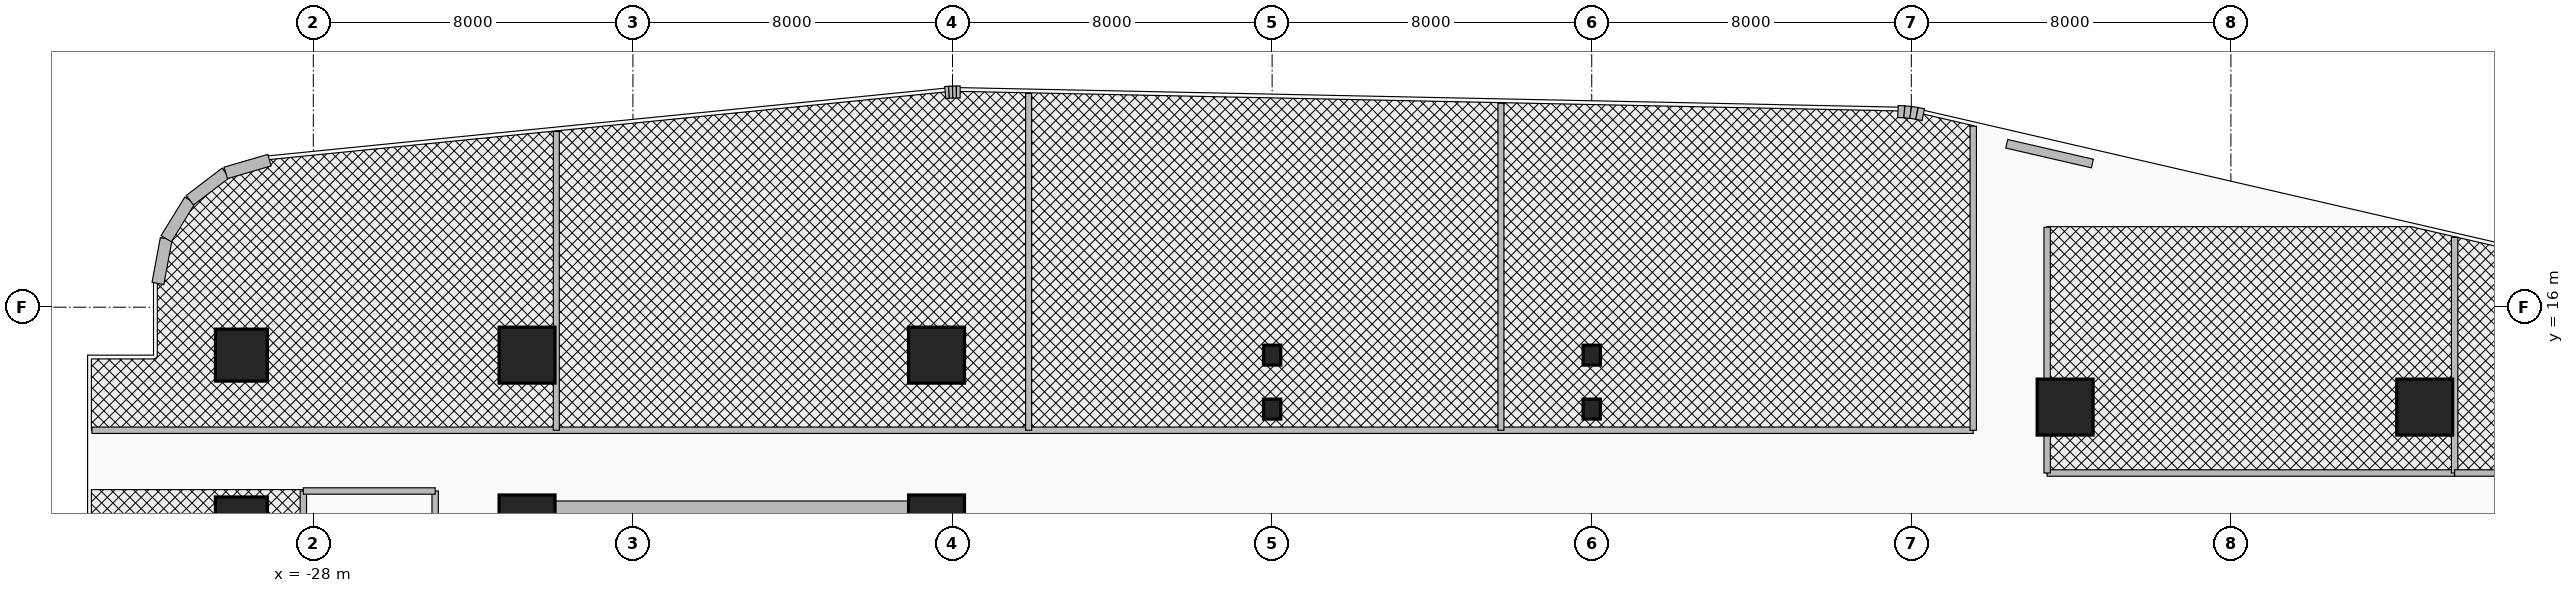
"""IFC4 building model, lengths in metres.
Left out: names, types, materials, properties, quantities, classifications, styles, units other than length and angle.
Written with IfcOpenShell. Run it as: python <this file> out.ifc"""

import sys

from ifc_helpers import new_model, si_unit, direction, frame, frame_2d, origin, origin_2d, place, context, subcontext, project, spatial, rectangle, circle, i_section, extrude, source, transform, mapped, element, fill, save


model = new_model("IFC4")
c1 = context("Model", 3, precision=1e-05, world=origin(), true_north=direction((0.0, 1.0)))
c2 = subcontext(c1, "Body", "Model", "MODEL_VIEW")
j1 = project(units=[si_unit("LENGTHUNIT", "METRE"), si_unit("PLANEANGLEUNIT", "RADIAN")], contexts=[c1])
p1 = place(None, origin())
s1 = spatial("IfcSite", under=j1, at=p1, CompositionType="ELEMENT")
p2 = place(p1, origin())
s2 = spatial("IfcBuilding", under=s1, at=p2, CompositionType="ELEMENT")
p3 = place(p2, frame((0.0, 0.0, 48.2)))
s3 = spatial("IfcBuildingStorey", under=s2, at=p3, CompositionType="ELEMENT", Elevation=48.2)
p4 = place(p3, frame((-22.65, -11.15, 0.0), z_axis=(0.0, 0.0, 1.0), x_axis=(0.0, 1.0, 0.0)))
e1 = element("IfcWall", 1, at=p4, inside=s3, PredefinedType="SHEAR", context=c2, shape_type="SweptSolid", body=[
    extrude(rectangle(XDim=22.3, YDim=0.7, at=frame_2d((11.15, 0.0))), origin(), (0.0, 0.0, 1.0), 3.46),
])
p5 = place(p3, frame((-22.65, 10.8, 0.0), z_axis=(0.0, 0.0, 1.0), x_axis=(1.0, 0.0, 0.0)))
e2 = element("IfcWall", 2, at=p5, inside=s3, PredefinedType="SHEAR", context=c2, shape_type="SweptSolid", body=[
    extrude(rectangle(XDim=10.25, YDim=0.7, at=frame_2d((5.125, 0.0))), origin(), (0.0, 0.0, 1.0), 3.46),
])
m1 = source(origin(), c2, "Body", "SweptSolid", [
    extrude(circle(Radius=0.65, at=origin_2d()), origin(), (0.0, 0.0, 1.0), 3.7),
])
p6 = place(p3, frame((-29.8, 10.6, 0.0), z_axis=(0.0, 0.0, 1.0), x_axis=(1.0, 0.0, 0.0)))
e3 = element("IfcColumn", 3, at=p6, inside=s3, PredefinedType="COLUMN", context=c2, shape_type="MappedRepresentation", body=[
    mapped(m1, transform((0.0, 0.0, 0.0), x_axis=(1.0, 0.0, 0.0), y_axis=(0.0, 1.0, 0.0), z_axis=(0.0, 0.0, 1.0), scale=1.0)),
])
m2 = source(origin(), c2, "Body", "SweptSolid", [
    extrude(rectangle(XDim=1.4, YDim=1.4, at=origin_2d()), origin(), (0.0, 0.0, 1.0), 3.7),
])
for number, where, z_axis, x_axis in (
    (4, (-22.65, 10.6, 0.0), (0.0, 0.0, 1.0), (1.0, 0.0, 0.0)),
    (5, (-12.4, 10.6, 0.0), (0.0, 0.0, 1.0), (1.0, 0.0, 0.0)),
):
    element("IfcColumn", number, at=place(p3, frame(where, z_axis=z_axis, x_axis=x_axis)), inside=s3, PredefinedType="COLUMN", context=c2, shape_type="MappedRepresentation", body=[
        mapped(m2, transform((0.0, 0.0, 0.0), x_axis=(1.0, 0.0, 0.0), y_axis=(0.0, 1.0, 0.0), z_axis=(0.0, 0.0, 1.0), scale=1.0)),
    ])
p7 = place(p3, frame((-29.8, 14.8, 0.0), z_axis=(0.0, 0.0, 1.0), x_axis=(1.0, 0.0, 0.0)))
e6 = element("IfcColumn", 6, at=p7, inside=s3, PredefinedType="COLUMN", context=c2, shape_type="MappedRepresentation", body=[
    mapped(m1, transform((0.0, 0.0, 0.0), x_axis=(1.0, 0.0, 0.0), y_axis=(0.0, 1.0, 0.0), z_axis=(0.0, 0.0, 1.0), scale=1.0)),
])
for number, where, z_axis, x_axis in (
    (7, (-22.65, 14.8, 0.0), (0.0, 0.0, 1.0), (1.0, 0.0, 0.0)),
    (8, (-12.4, 14.8, 0.0), (0.0, 0.0, 1.0), (1.0, 0.0, 0.0)),
    (9, (15.85, 13.5, 0.0), (0.0, 0.0, 1.0), (1.0, 0.0, 0.0)),
    (10, (24.85, 13.5, 0.0), (0.0, 0.0, 1.0), (1.0, 0.0, 0.0)),
):
    element("IfcColumn", number, at=place(p3, frame(where, z_axis=z_axis, x_axis=x_axis)), inside=s3, PredefinedType="COLUMN", context=c2, shape_type="MappedRepresentation", body=[
        mapped(m2, transform((0.0, 0.0, 0.0), x_axis=(1.0, 0.0, 0.0), y_axis=(0.0, 1.0, 0.0), z_axis=(0.0, 0.0, 1.0), scale=1.0)),
    ])
m3 = source(origin(), c2, "Body", "SweptSolid", [
    extrude(i_section(OverallWidth=0.432, OverallDepth=0.498, WebThickness=0.056, FlangeThickness=0.089, at=origin_2d()), origin(), (0.0, 0.0, 1.0), 3.7),
])
for number, where, z_axis, x_axis in (
    (11, (-4.0, 13.45, 0.0), (0.0, 0.0, 1.0), (1.0, 0.0, 0.0)),
    (12, (-4.0, 14.8, 0.0), (0.0, 0.0, 1.0), (1.0, 0.0, 0.0)),
    (13, (4.0, 13.45, 0.0), (0.0, 0.0, 1.0), (1.0, 0.0, 0.0)),
    (14, (4.0, 14.8, 0.0), (0.0, 0.0, 1.0), (1.0, 0.0, 0.0)),
):
    element("IfcColumn", number, at=place(p3, frame(where, z_axis=z_axis, x_axis=x_axis)), inside=s3, PredefinedType="COLUMN", context=c2, shape_type="MappedRepresentation", body=[
        mapped(m3, transform((0.0, 0.0, 0.0), x_axis=(1.0, 0.0, 0.0), y_axis=(0.0, 1.0, 0.0), z_axis=(0.0, 0.0, 1.0), scale=1.0)),
    ])
p8 = place(p3, frame((-31.89, 16.594, 0.0), z_axis=(0.0, 0.0, 1.0), x_axis=(0.182748995683, 0.9831596028, 0.0)))
e15 = element("IfcWall", 15, at=p8, inside=s3, PredefinedType="SOLIDWALL", context=c2, shape_type="SweptSolid", body=[
    extrude(rectangle(XDim=1.14, YDim=0.3, at=frame_2d((0.57, 0.0))), origin(), (0.0, 0.0, 1.0), 3.46),
])
p9 = place(p3, frame((-31.682, 17.714, 0.0), z_axis=(0.0, 0.0, 1.0), x_axis=(0.524157723014, 0.8516212077, 0.0)))
e16 = element("IfcWall", 16, at=p9, inside=s3, PredefinedType="SOLIDWALL", context=c2, shape_type="SweptSolid", body=[
    extrude(rectangle(XDim=1.129, YDim=0.3, at=frame_2d((0.565, 0.0))), origin(), (0.0, 0.0, 1.0), 3.46),
])
p10 = place(p3, frame((-31.09, 18.676, 0.0), z_axis=(0.0, 0.0, 1.0), x_axis=(0.795253002434, 0.606277710393, 0.0)))
e17 = element("IfcWall", 17, at=p10, inside=s3, PredefinedType="SOLIDWALL", context=c2, shape_type="SweptSolid", body=[
    extrude(rectangle(XDim=1.129, YDim=0.3, at=frame_2d((0.564, 0.0))), origin(), (0.0, 0.0, 1.0), 3.46),
])
p11 = place(p3, frame((-30.192, 19.361, 0.0), z_axis=(0.0, 0.0, 1.0), x_axis=(0.960071941549, 0.279753225271, 0.0)))
e18 = element("IfcWall", 18, at=p11, inside=s3, PredefinedType="SOLIDWALL", context=c2, shape_type="SweptSolid", body=[
    extrude(rectangle(XDim=1.14, YDim=0.3, at=frame_2d((0.57, 0.0))), origin(), (0.0, 0.0, 1.0), 3.46),
])
p12 = place(p3, frame((-12.182, 21.371, 0.0), z_axis=(0.0, 0.0, 1.0), x_axis=(0.996527790842, 0.08326080759, 0.0)))
e19 = element("IfcWall", 19, at=p12, inside=s3, PredefinedType="SOLIDWALL", context=c2, shape_type="SweptSolid", body=[
    extrude(rectangle(XDim=0.094, YDim=0.3, at=frame_2d((0.047, 0.0))), origin(), (0.0, 0.0, 1.0), 3.46),
])
p13 = place(p3, frame((-12.088, 21.379, 0.0), z_axis=(0.0, 0.0, 1.0), x_axis=(0.998476480444, 0.055178963393, 0.0)))
e20 = element("IfcWall", 20, at=p13, inside=s3, PredefinedType="SOLIDWALL", context=c2, shape_type="SweptSolid", body=[
    extrude(rectangle(XDim=0.093, YDim=0.3, at=frame_2d((0.046, 0.0))), origin(), (0.0, 0.0, 1.0), 3.46),
])
p14 = place(p3, frame((-11.996, 21.384, 0.0), z_axis=(0.0, 0.0, 1.0), x_axis=(0.999722573757, 0.023553673204, 0.0)))
e21 = element("IfcWall", 21, at=p14, inside=s3, PredefinedType="SOLIDWALL", context=c2, shape_type="SweptSolid", body=[
    extrude(rectangle(XDim=0.093, YDim=0.3, at=frame_2d((0.047, 0.0))), origin(), (0.0, 0.0, 1.0), 3.46),
])
p15 = place(p3, frame((-11.902, 21.386, 0.0), z_axis=(0.0, 0.0, 1.0), x_axis=(0.999986507273, -0.005194735103, 0.0)))
e22 = element("IfcWall", 22, at=p15, inside=s3, PredefinedType="SOLIDWALL", context=c2, shape_type="SweptSolid", body=[
    extrude(rectangle(XDim=0.094, YDim=0.3, at=frame_2d((0.047, 0.0))), origin(), (0.0, 0.0, 1.0), 3.46),
])
p16 = place(p3, frame((11.666, 20.897, 0.0), z_axis=(0.0, 0.0, 1.0), x_axis=(0.998885297239, -0.047203421059, 0.0)))
e23 = element("IfcWall", 23, at=p16, inside=s3, PredefinedType="SOLIDWALL", context=c2, shape_type="SweptSolid", body=[
    extrude(rectangle(XDim=0.16, YDim=0.3, at=frame_2d((0.08, 0.0))), origin(), (0.0, 0.0, 1.0), 3.46),
])
p17 = place(p3, frame((11.826, 20.889, 0.0), z_axis=(0.0, 0.0, 1.0), x_axis=(0.995172891136, -0.098137234257, 0.0)))
e24 = element("IfcWall", 24, at=p17, inside=s3, PredefinedType="SOLIDWALL", context=c2, shape_type="SweptSolid", body=[
    extrude(rectangle(XDim=0.159, YDim=0.3, at=frame_2d((0.08, 0.0))), origin(), (0.0, 0.0, 1.0), 3.46),
])
p18 = place(p3, frame((11.984, 20.874, 0.0), z_axis=(0.0, 0.0, 1.0), x_axis=(0.988846069207, -0.148941100486, 0.0)))
e25 = element("IfcWall", 25, at=p18, inside=s3, PredefinedType="SOLIDWALL", context=c2, shape_type="SweptSolid", body=[
    extrude(rectangle(XDim=0.159, YDim=0.3, at=frame_2d((0.08, 0.0))), origin(), (0.0, 0.0, 1.0), 3.46),
])
p19 = place(p3, frame((12.142, 20.85, 0.0), z_axis=(0.0, 0.0, 1.0), x_axis=(0.979991950448, -0.19903712482, 0.0)))
e26 = element("IfcWall", 26, at=p19, inside=s3, PredefinedType="SOLIDWALL", context=c2, shape_type="SweptSolid", body=[
    extrude(rectangle(XDim=0.161, YDim=0.3, at=frame_2d((0.08, 0.0))), origin(), (0.0, 0.0, 1.0), 3.46),
])
p20 = place(p3, frame((14.389, 20.09, 0.0), z_axis=(0.0, 0.0, 1.0), x_axis=(0.974400545997, -0.224818984875, 0.0)))
e27 = element("IfcWall", 27, at=p20, inside=s3, PredefinedType="SOLIDWALL", context=c2, shape_type="SweptSolid", body=[
    extrude(rectangle(XDim=2.2, YDim=0.22, at=frame_2d((1.1, 0.0))), origin(), (0.0, 0.0, 1.0), 3.46),
])
p21 = place(p20, frame((0.65, 0.0, 0.95)))
e28 = element("IfcOpeningElement", 28, at=p21, cuts=e27, PredefinedType="OPENING", context=c2, shape_type="SweptSolid", body=[
    extrude(rectangle(XDim=0.9, YDim=1.3, at=frame_2d((0.45, 0.65))), frame((0.0, 0.125, 0.0), z_axis=(0.0, -1.0, 0.0), x_axis=(1.0, 0.0, 0.0)), (0.0, 0.0, 1.0), 0.25),
])
p22 = place(p3, frame((-28.25, 8.8, 0.0), z_axis=(0.0, 0.0, 1.0), x_axis=(0.0, 1.0, 0.0)))
e29 = element("IfcWall", 29, at=p22, inside=s3, PredefinedType="PARTITIONING", context=c2, shape_type="SweptSolid", body=[
    extrude(rectangle(XDim=2.6, YDim=0.16, at=frame_2d((1.3, 0.0))), origin(), (0.0, 0.0, 1.0), 2.583),
])
p23 = place(p3, frame((-24.95, 8.8, 0.0), z_axis=(0.0, 0.0, 1.0), x_axis=(0.0, 1.0, 0.0)))
e30 = element("IfcWall", 30, at=p23, inside=s3, PredefinedType="PARTITIONING", context=c2, shape_type="SweptSolid", body=[
    extrude(rectangle(XDim=2.6, YDim=0.16, at=frame_2d((1.3, 0.0))), origin(), (0.0, 0.0, 1.0), 2.583),
])
p24 = place(p23, frame((0.3, 0.0, 0.0)))
e31 = element("IfcOpeningElement", 31, at=p24, cuts=e30, PredefinedType="OPENING", context=c2, shape_type="SweptSolid", body=[
    extrude(rectangle(XDim=0.85, YDim=2.1, at=frame_2d((0.425, 1.05))), frame((0.0, 0.095, 0.0), z_axis=(0.0, -1.0, 0.0), x_axis=(1.0, 0.0, 0.0)), (0.0, 0.0, 1.0), 0.19),
])
p25 = place(p23, frame((1.45, 0.0, 0.0)))
e32 = element("IfcOpeningElement", 32, at=p25, cuts=e30, PredefinedType="OPENING", context=c2, shape_type="SweptSolid", body=[
    extrude(rectangle(XDim=0.85, YDim=2.1, at=frame_2d((0.425, 1.05))), frame((0.0, 0.095, 0.0), z_axis=(0.0, -1.0, 0.0), x_axis=(1.0, 0.0, 0.0)), (0.0, 0.0, 1.0), 0.19),
])
p26 = place(p3, frame((-28.25, 11.4, 0.0), z_axis=(0.0, 0.0, 1.0), x_axis=(1.0, 0.0, 0.0)))
e33 = element("IfcWall", 33, at=p26, inside=s3, PredefinedType="PARTITIONING", context=c2, shape_type="SweptSolid", body=[
    extrude(rectangle(XDim=3.3, YDim=0.16, at=frame_2d((1.65, 0.0))), origin(), (0.0, 0.0, 1.0), 3.46),
])
p27 = place(p3, frame((-33.54, 12.92, 0.0), z_axis=(0.0, 0.0, 1.0), x_axis=(1.0, 0.0, 0.0)))
e34 = element("IfcWall", 34, at=p27, inside=s3, PredefinedType="PARTITIONING", context=c2, shape_type="SweptSolid", body=[
    extrude(rectangle(XDim=47.09, YDim=0.16, at=frame_2d((23.545, 0.0))), origin(), (0.0, 0.0, 1.0), 2.583),
])
p28 = place(p27, frame((4.911, 0.0, 0.0)))
e35 = element("IfcOpeningElement", 35, at=p28, cuts=e34, PredefinedType="OPENING", context=c2, shape_type="SweptSolid", body=[
    extrude(rectangle(XDim=1.8, YDim=2.15, at=frame_2d((0.9, 1.075))), frame((0.0, 0.095, 0.0), z_axis=(0.0, -1.0, 0.0), x_axis=(1.0, 0.0, 0.0)), (0.0, 0.0, 1.0), 0.19),
])
p29 = place(p27, frame((16.634, 0.0, 0.0)))
e36 = element("IfcOpeningElement", 36, at=p29, cuts=e34, PredefinedType="OPENING", context=c2, shape_type="SweptSolid", body=[
    extrude(rectangle(XDim=1.8, YDim=2.15, at=frame_2d((0.9, 1.075))), frame((0.0, 0.095, 0.0), z_axis=(0.0, -1.0, 0.0), x_axis=(1.0, 0.0, 0.0)), (0.0, 0.0, 1.0), 0.19),
])
p30 = place(p27, frame((27.285, 0.0, 0.0)))
e37 = element("IfcOpeningElement", 37, at=p30, cuts=e34, PredefinedType="OPENING", context=c2, shape_type="SweptSolid", body=[
    extrude(rectangle(XDim=1.8, YDim=2.15, at=frame_2d((0.9, 1.075))), frame((0.0, 0.095, 0.0), z_axis=(0.0, -1.0, 0.0), x_axis=(1.0, 0.0, 0.0)), (0.0, 0.0, 1.0), 0.19),
])
p31 = place(p27, frame((40.279, 0.0, 0.0)))
e38 = element("IfcOpeningElement", 38, at=p31, cuts=e34, PredefinedType="OPENING", context=c2, shape_type="SweptSolid", body=[
    extrude(rectangle(XDim=1.8, YDim=2.15, at=frame_2d((0.9, 1.075))), frame((0.0, 0.095, 0.0), z_axis=(0.0, -1.0, 0.0), x_axis=(1.0, 0.0, 0.0)), (0.0, 0.0, 1.0), 0.19),
])
p32 = place(p3, frame((13.55, 12.92, 0.0), z_axis=(0.0, 0.0, 1.0), x_axis=(0.0, 1.0, 0.0)))
e39 = element("IfcWall", 39, at=p32, inside=s3, PredefinedType="PARTITIONING", context=c2, shape_type="SweptSolid", body=[
    extrude(rectangle(XDim=7.609, YDim=0.16, at=frame_2d((3.805, 0.0))), origin(), (0.0, 0.0, 1.0), 2.583),
])
p33 = place(p3, frame((-21.917, 12.92, 0.0), z_axis=(0.0, 0.0, 1.0), x_axis=(0.0, 1.0, 0.0)))
e40 = element("IfcWall", 40, at=p33, inside=s3, PredefinedType="PARTITIONING", context=c2, shape_type="SweptSolid", body=[
    extrude(rectangle(XDim=7.478, YDim=0.15, at=frame_2d((3.739, 0.0))), origin(), (0.0, 0.0, 1.0), 2.583),
])
p34 = place(p3, frame((-10.095, 12.92, 0.0), z_axis=(0.0, 0.0, 1.0), x_axis=(0.0, 1.0, 0.0)))
e41 = element("IfcWall", 41, at=p34, inside=s3, PredefinedType="PARTITIONING", context=c2, shape_type="SweptSolid", body=[
    extrude(rectangle(XDim=8.43, YDim=0.15, at=frame_2d((4.215, 0.0))), origin(), (0.0, 0.0, 1.0), 2.583),
])
p35 = place(p3, frame((1.728, 12.92, 0.0), z_axis=(0.0, 0.0, 1.0), x_axis=(0.0, 1.0, 0.0)))
e42 = element("IfcWall", 42, at=p35, inside=s3, PredefinedType="PARTITIONING", context=c2, shape_type="SweptSolid", body=[
    extrude(rectangle(XDim=8.184, YDim=0.15, at=frame_2d((4.092, 0.0))), origin(), (0.0, 0.0, 1.0), 2.583),
])
p36 = place(p3, frame((15.4, 11.85, 0.0), z_axis=(0.0, 0.0, 1.0), x_axis=(1.0, 0.0, 0.0)))
e43 = element("IfcWall", 43, at=p36, inside=s3, PredefinedType="PARTITIONING", context=c2, shape_type="SweptSolid", body=[
    extrude(rectangle(XDim=10.2, YDim=0.16, at=frame_2d((5.1, 0.0))), origin(), (0.0, 0.0, 1.0), 2.834),
])
p37 = place(p36, frame((4.65, 0.0, 0.0)))
e44 = element("IfcOpeningElement", 44, at=p37, cuts=e43, PredefinedType="OPENING", context=c2, shape_type="SweptSolid", body=[
    extrude(rectangle(XDim=0.9, YDim=2.1, at=frame_2d((0.45, 1.05))), frame((0.0, 0.095, 0.0), z_axis=(0.0, -1.0, 0.0), x_axis=(1.0, 0.0, 0.0)), (0.0, 0.0, 1.0), 0.19),
])
p38 = place(p3, frame((15.4, 11.85, 0.0), z_axis=(0.0, 0.0, 1.0), x_axis=(0.0, 1.0, 0.0)))
e45 = element("IfcWall", 45, at=p38, inside=s3, PredefinedType="PARTITIONING", context=c2, shape_type="SweptSolid", body=[
    extrude(rectangle(XDim=6.15, YDim=0.16, at=frame_2d((3.075, 0.0))), origin(), (0.0, 0.0, 1.0), 2.583),
])
p39 = place(p3, frame((25.6, 11.85, 0.0), z_axis=(0.0, 0.0, 1.0), x_axis=(0.0, 1.0, 0.0)))
e46 = element("IfcWall", 46, at=p39, inside=s3, PredefinedType="PARTITIONING", context=c2, shape_type="SweptSolid", body=[
    extrude(rectangle(XDim=5.898, YDim=0.16, at=frame_2d((2.949, 0.0))), origin(), (0.0, 0.0, 1.0), 2.583),
])
p40 = place(p3, frame((25.6, 11.85, 0.0), z_axis=(0.0, 0.0, 1.0), x_axis=(1.0, 0.0, 0.0)))
e47 = element("IfcWall", 47, at=p40, inside=s3, PredefinedType="PARTITIONING", context=c2, shape_type="SweptSolid", body=[
    extrude(rectangle(XDim=5.79, YDim=0.16, at=frame_2d((2.895, 0.0))), origin(), (0.0, 0.0, 1.0), 2.896),
])
p41 = place(p40, frame((0.3, 0.0, 0.0)))
e48 = element("IfcOpeningElement", 48, at=p41, cuts=e47, PredefinedType="OPENING", context=c2, shape_type="SweptSolid", body=[
    extrude(rectangle(XDim=0.9, YDim=2.1, at=frame_2d((0.45, 1.05))), frame((0.0, 0.095, 0.0), z_axis=(0.0, -1.0, 0.0), x_axis=(1.0, 0.0, 0.0)), (0.0, 0.0, 1.0), 0.19),
])
p42 = place(p21, origin())
e49 = element("IfcWindow", 49, at=p42, inside=s3, PartitioningType="SINGLE_PANEL", PredefinedType="WINDOW", context=c2, shape_type="SweptSolid", body=[
    extrude(rectangle(XDim=0.9, YDim=1.3, at=frame_2d((0.45, 0.65))), frame((0.0, 0.03, 0.0), z_axis=(0.0, -1.0, 0.0), x_axis=(1.0, 0.0, 0.0)), (0.0, 0.0, 1.0), 0.06),
])
fill(e28, e49)
p43 = place(p25, origin())
e50 = element("IfcDoor", 50, at=p43, inside=s3, OperationType="SINGLE_SWING_RIGHT", PredefinedType="DOOR", context=c2, shape_type="SweptSolid", body=[
    extrude(rectangle(XDim=0.85, YDim=2.1, at=frame_2d((0.425, 1.05))), frame((0.0, 0.025, 0.0), z_axis=(0.0, -1.0, 0.0), x_axis=(1.0, 0.0, 0.0)), (0.0, 0.0, 1.0), 0.05),
])
fill(e32, e50)
p44 = place(p28, frame((1.8, 0.0, 0.0), z_axis=(0.0, 0.0, 1.0), x_axis=(-1.0, 0.0, 0.0)))
e51 = element("IfcDoor", 51, at=p44, inside=s3, OperationType="DOUBLE_DOOR_SINGLE_SWING", PredefinedType="DOOR", context=c2, shape_type="SweptSolid", body=[
    extrude(rectangle(XDim=1.8, YDim=2.15, at=frame_2d((0.9, 1.075))), frame((0.0, 0.025, 0.0), z_axis=(0.0, -1.0, 0.0), x_axis=(1.0, 0.0, 0.0)), (0.0, 0.0, 1.0), 0.05),
])
fill(e35, e51)
p45 = place(p29, origin())
e52 = element("IfcDoor", 52, at=p45, inside=s3, OperationType="DOUBLE_DOOR_SINGLE_SWING", PredefinedType="DOOR", context=c2, shape_type="SweptSolid", body=[
    extrude(rectangle(XDim=1.8, YDim=2.15, at=frame_2d((0.9, 1.075))), frame((0.0, 0.025, 0.0), z_axis=(0.0, -1.0, 0.0), x_axis=(1.0, 0.0, 0.0)), (0.0, 0.0, 1.0), 0.05),
])
fill(e36, e52)
p46 = place(p30, frame((1.8, 0.0, 0.0), z_axis=(0.0, 0.0, 1.0), x_axis=(-1.0, 0.0, 0.0)))
e53 = element("IfcDoor", 53, at=p46, inside=s3, OperationType="DOUBLE_DOOR_SINGLE_SWING", PredefinedType="DOOR", context=c2, shape_type="SweptSolid", body=[
    extrude(rectangle(XDim=1.8, YDim=2.15, at=frame_2d((0.9, 1.075))), frame((0.0, 0.025, 0.0), z_axis=(0.0, -1.0, 0.0), x_axis=(1.0, 0.0, 0.0)), (0.0, 0.0, 1.0), 0.05),
])
fill(e37, e53)
p47 = place(p31, origin())
e54 = element("IfcDoor", 54, at=p47, inside=s3, OperationType="DOUBLE_DOOR_SINGLE_SWING", PredefinedType="DOOR", context=c2, shape_type="SweptSolid", body=[
    extrude(rectangle(XDim=1.8, YDim=2.15, at=frame_2d((0.9, 1.075))), frame((0.0, 0.025, 0.0), z_axis=(0.0, -1.0, 0.0), x_axis=(1.0, 0.0, 0.0)), (0.0, 0.0, 1.0), 0.05),
])
fill(e38, e54)
p48 = place(p37, frame((0.9, 0.0, 0.0), z_axis=(0.0, 0.0, 1.0), x_axis=(-1.0, 0.0, 0.0)))
e55 = element("IfcDoor", 55, at=p48, inside=s3, OperationType="SINGLE_SWING_LEFT", PredefinedType="DOOR", context=c2, shape_type="SweptSolid", body=[
    extrude(rectangle(XDim=0.9, YDim=2.1, at=frame_2d((0.45, 1.05))), frame((0.0, 0.025, 0.0), z_axis=(0.0, -1.0, 0.0), x_axis=(1.0, 0.0, 0.0)), (0.0, 0.0, 1.0), 0.05),
])
fill(e44, e55)
p49 = place(p41, origin())
e56 = element("IfcDoor", 56, at=p49, inside=s3, OperationType="SINGLE_SWING_LEFT", PredefinedType="DOOR", context=c2, shape_type="SweptSolid", body=[
    extrude(rectangle(XDim=0.9, YDim=2.1, at=frame_2d((0.45, 1.05))), frame((0.0, 0.025, 0.0), z_axis=(0.0, -1.0, 0.0), x_axis=(1.0, 0.0, 0.0)), (0.0, 0.0, 1.0), 0.05),
])
fill(e48, e56)
save(model, sys.argv[1])
